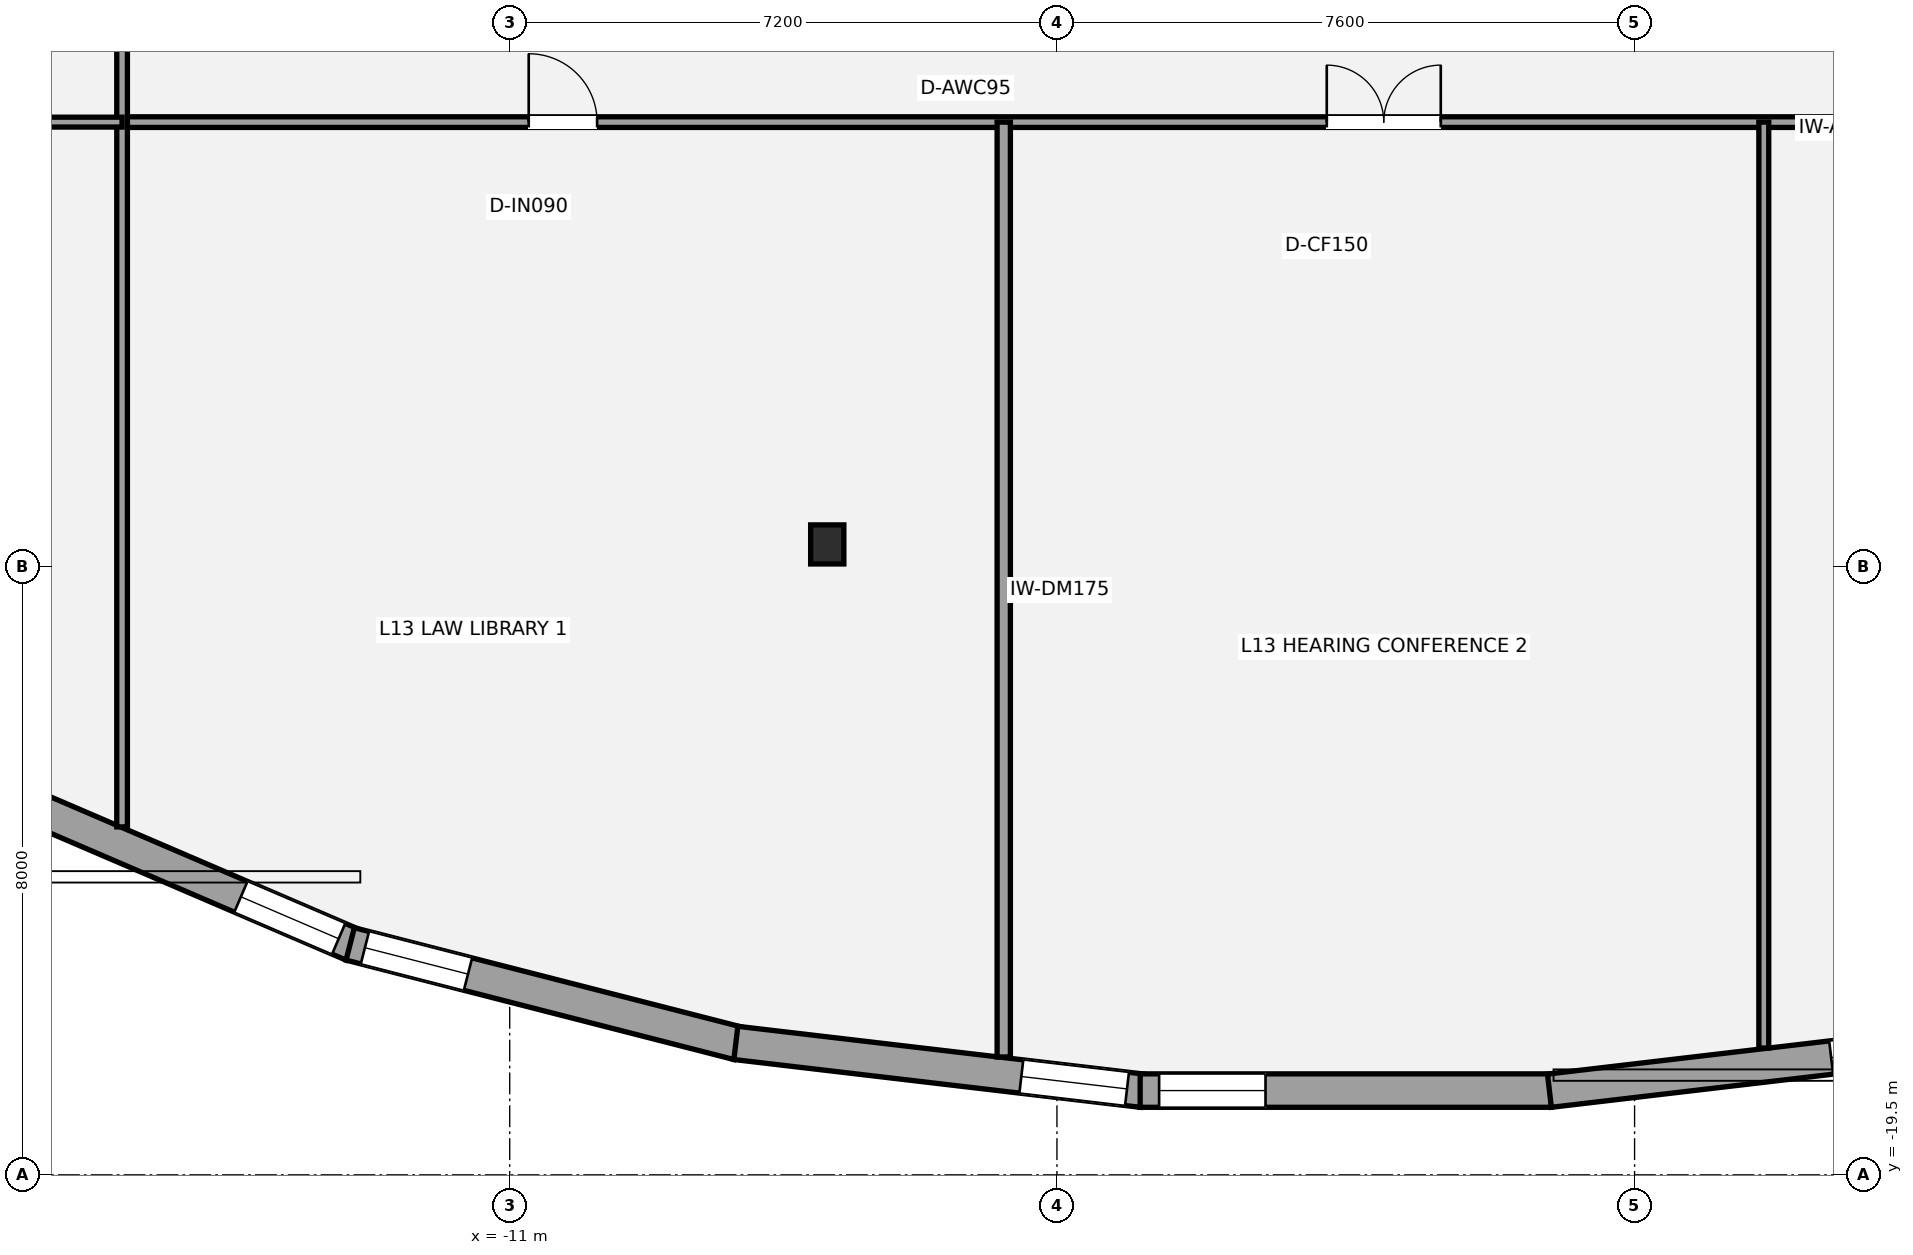
"""IFC4 building model, lengths in metres.
Left out: names, types, materials, properties, quantities, classifications, styles, units other than length and angle.
Written with IfcOpenShell. Run it as: python <this file> out.ifc"""

import sys

from ifc_helpers import new_model, si_unit, direction, frame, frame_2d, origin, origin_2d, place, context, subcontext, project, spatial, rectangle, i_section, extrude, element, fill, save


model = new_model("IFC4")
c1 = context("Model", 3, precision=1e-05, world=origin(), true_north=direction((0.0, 1.0)))
c2 = subcontext(c1, "Body", "Model", "MODEL_VIEW")
j1 = project(units=[si_unit("LENGTHUNIT", "METRE"), si_unit("PLANEANGLEUNIT", "RADIAN")], contexts=[c1])
p1 = place(None, origin())
s1 = spatial("IfcSite", under=j1, at=p1, CompositionType="ELEMENT")
p2 = place(p1, origin())
s2 = spatial("IfcBuilding", under=s1, at=p2, CompositionType="ELEMENT")
p3 = place(p2, frame((0.0, 0.0, 52.2)))
s3 = spatial("IfcBuildingStorey", under=s2, at=p3, CompositionType="ELEMENT", Elevation=52.2)
p4 = place(p3, frame((-6.822, -11.206, 0.0), z_axis=(0.0, 0.0, 1.0), x_axis=(1.0, 0.0, 0.0)))
e1 = element("IfcColumn", 1, at=p4, inside=s3, PredefinedType="COLUMN", context=c2, shape_type="SweptSolid", body=[
    extrude(i_section(OverallWidth=0.437, OverallDepth=0.514, WebThickness=0.061, FlangeThickness=0.097, at=origin_2d()), origin(), (0.0, 0.0, 1.0), 3.6),
])
p5 = place(p3, frame((-13.067, -16.473, 0.0), z_axis=(0.0, 0.0, 1.0), x_axis=(-0.918881850071, 0.394532819433, 0.0)))
e2 = element("IfcWall", 2, at=p5, inside=s3, PredefinedType="STANDARD", context=c2, shape_type="SweptSolid", body=[
    extrude(rectangle(XDim=5.042, YDim=0.44, at=frame_2d((2.521, 0.0))), origin(), (0.0, 0.0, 1.0), 2.533),
])
p6 = place(p5, frame((0.2, 0.0, 0.58)))
e3 = element("IfcOpeningElement", 3, at=p6, cuts=e2, PredefinedType="OPENING", context=c2, shape_type="SweptSolid", body=[
    extrude(rectangle(XDim=1.4, YDim=1.55, at=frame_2d((0.7, 0.775))), frame((0.0, 0.23, 0.0), z_axis=(0.0, -1.0, 0.0), x_axis=(1.0, 0.0, 0.0)), (0.0, 0.0, 1.0), 0.46),
])
p7 = place(p3, frame((-7.996, -17.77, 0.0), z_axis=(0.0, 0.0, 1.0), x_axis=(-0.968705592422, 0.248212560542, 0.0)))
e4 = element("IfcWall", 4, at=p7, inside=s3, PredefinedType="STANDARD", context=c2, shape_type="SweptSolid", body=[
    extrude(rectangle(XDim=5.268, YDim=0.44, at=frame_2d((2.634, 0.0))), origin(), (0.0, 0.0, 1.0), 2.533),
])
p8 = place(p7, frame((3.668, 0.0, 0.45)))
e5 = element("IfcOpeningElement", 5, at=p8, cuts=e4, PredefinedType="OPENING", context=c2, shape_type="SweptSolid", body=[
    extrude(rectangle(XDim=1.4, YDim=1.55, at=frame_2d((0.7, 0.775))), frame((0.0, 0.23, 0.0), z_axis=(0.0, -1.0, 0.0), x_axis=(1.0, 0.0, 0.0)), (0.0, 0.0, 1.0), 0.46),
])
p9 = place(p3, frame((-2.679, -18.393, 0.0), z_axis=(0.0, 0.0, 1.0), x_axis=(-0.993159890371, 0.116762289112, 0.0)))
e6 = element("IfcWall", 6, at=p9, inside=s3, PredefinedType="STANDARD", context=c2, shape_type="SweptSolid", body=[
    extrude(rectangle(XDim=5.382, YDim=0.44, at=frame_2d((2.691, 0.0))), origin(), (0.0, 0.0, 1.0), 2.533),
])
p10 = place(p9, frame((0.2, 0.0, 0.58)))
e7 = element("IfcOpeningElement", 7, at=p10, cuts=e6, PredefinedType="OPENING", context=c2, shape_type="SweptSolid", body=[
    extrude(rectangle(XDim=1.4, YDim=1.55, at=frame_2d((0.7, 0.775))), frame((0.0, 0.23, 0.0), z_axis=(0.0, -1.0, 0.0), x_axis=(1.0, 0.0, 0.0)), (0.0, 0.0, 1.0), 0.46),
])
p11 = place(p3, frame((2.705, -18.391, 0.0), z_axis=(0.0, 0.0, 1.0), x_axis=(-1.0, 0.0, 0.0)))
e8 = element("IfcWall", 8, at=p11, inside=s3, PredefinedType="STANDARD", context=c2, shape_type="SweptSolid", body=[
    extrude(rectangle(XDim=5.41, YDim=0.44, at=frame_2d((2.705, 0.0))), origin(), (0.0, 0.0, 1.0), 2.533),
])
p12 = place(p11, frame((3.761, 0.0, 0.58)))
e9 = element("IfcOpeningElement", 9, at=p12, cuts=e8, PredefinedType="OPENING", context=c2, shape_type="SweptSolid", body=[
    extrude(rectangle(XDim=1.4, YDim=1.55, at=frame_2d((0.7, 0.775))), frame((0.0, 0.23, 0.0), z_axis=(0.0, -1.0, 0.0), x_axis=(1.0, 0.0, 0.0)), (0.0, 0.0, 1.0), 0.46),
])
p13 = place(p3, frame((8.025, -17.764, 0.0), z_axis=(0.0, 0.0, 1.0), x_axis=(-0.993159890371, -0.116762289112, 0.0)))
e10 = element("IfcWall", 10, at=p13, inside=s3, PredefinedType="STANDARD", context=c2, shape_type="SweptSolid", body=[
    extrude(rectangle(XDim=5.382, YDim=0.44, at=frame_2d((2.691, 0.0))), origin(), (0.0, 0.0, 1.0), 2.533),
])
p14 = place(p13, frame((0.25, 0.0, 0.45)))
e11 = element("IfcOpeningElement", 11, at=p14, cuts=e10, PredefinedType="OPENING", context=c2, shape_type="SweptSolid", body=[
    extrude(rectangle(XDim=1.4, YDim=1.55, at=frame_2d((0.7, 0.775))), frame((0.0, 0.23, 0.0), z_axis=(0.0, -1.0, 0.0), x_axis=(1.0, 0.0, 0.0)), (0.0, 0.0, 1.0), 0.46),
])
p15 = place(p3, frame((-16.1, -5.65, 0.0), z_axis=(0.0, 0.0, 1.0), x_axis=(1.0, 0.0, 0.0)))
e12 = element("IfcWall", 12, at=p15, inside=s3, PredefinedType="PARTITIONING", context=c2, shape_type="SweptSolid", body=[
    extrude(rectangle(XDim=34.1, YDim=0.14, at=frame_2d((17.05, 0.0))), origin(), (0.0, 0.0, 1.0), 3.4),
])
p16 = place(p15, frame((5.35, 0.0, 0.0)))
e13 = element("IfcOpeningElement", 13, at=p16, cuts=e12, PredefinedType="OPENING", context=c2, shape_type="SweptSolid", body=[
    extrude(rectangle(XDim=0.9, YDim=2.1, at=frame_2d((0.45, 1.05))), frame((0.0, 0.08, 0.0), z_axis=(0.0, -1.0, 0.0), x_axis=(1.0, 0.0, 0.0)), (0.0, 0.0, 1.0), 0.16),
])
p17 = place(p15, frame((15.85, 0.0, 0.0)))
e14 = element("IfcOpeningElement", 14, at=p17, cuts=e12, PredefinedType="OPENING", context=c2, shape_type="SweptSolid", body=[
    extrude(rectangle(XDim=1.5, YDim=2.15, at=frame_2d((0.75, 1.075))), frame((0.0, 0.08, 0.0), z_axis=(0.0, -1.0, 0.0), x_axis=(1.0, 0.0, 0.0)), (0.0, 0.0, 1.0), 0.16),
])
p18 = place(p15, frame((27.4, 0.0, 0.0)))
e15 = element("IfcOpeningElement", 15, at=p18, cuts=e12, PredefinedType="OPENING", context=c2, shape_type="SweptSolid", body=[
    extrude(rectangle(XDim=0.9, YDim=2.1, at=frame_2d((0.45, 1.05))), frame((0.0, 0.08, 0.0), z_axis=(0.0, -1.0, 0.0), x_axis=(1.0, 0.0, 0.0)), (0.0, 0.0, 1.0), 0.16),
])
p19 = place(p3, frame((-16.1, -14.922, 0.0), z_axis=(0.0, 0.0, 1.0), x_axis=(0.0, 1.0, 0.0)))
e16 = element("IfcWall", 16, at=p19, inside=s3, PredefinedType="PARTITIONING", context=c2, shape_type="SweptSolid", body=[
    extrude(rectangle(XDim=20.772, YDim=0.14, at=frame_2d((10.386, 0.0))), origin(), (0.0, 0.0, 1.0), 2.841),
])
p20 = place(p19, frame((10.547, 0.0, 0.0)))
e17 = element("IfcOpeningElement", 17, at=p20, cuts=e16, PredefinedType="OPENING", context=c2, shape_type="SweptSolid", body=[
    extrude(rectangle(XDim=0.9, YDim=2.1, at=frame_2d((0.45, 1.05))), frame((0.0, 0.08, 0.0), z_axis=(0.0, -1.0, 0.0), x_axis=(1.0, 0.0, 0.0)), (0.0, 0.0, 1.0), 0.16),
])
p21 = place(p19, frame((14.472, 0.0, 0.0)))
e18 = element("IfcOpeningElement", 18, at=p21, cuts=e16, PredefinedType="OPENING", context=c2, shape_type="SweptSolid", body=[
    extrude(rectangle(XDim=0.9, YDim=2.1, at=frame_2d((0.45, 1.05))), frame((0.0, 0.08, 0.0), z_axis=(0.0, -1.0, 0.0), x_axis=(1.0, 0.0, 0.0)), (0.0, 0.0, 1.0), 0.16),
])
p22 = place(p19, frame((18.497, 0.0, 0.0)))
e19 = element("IfcOpeningElement", 19, at=p22, cuts=e16, PredefinedType="OPENING", context=c2, shape_type="SweptSolid", body=[
    extrude(rectangle(XDim=0.9, YDim=2.1, at=frame_2d((0.45, 1.05))), frame((0.0, 0.08, 0.0), z_axis=(0.0, -1.0, 0.0), x_axis=(1.0, 0.0, 0.0)), (0.0, 0.0, 1.0), 0.16),
])
p23 = place(p3, frame((-4.5, -17.949, 0.0), z_axis=(0.0, 0.0, 1.0), x_axis=(0.0, 1.0, 0.0)))
e20 = element("IfcWall", 20, at=p23, inside=s3, PredefinedType="PARTITIONING", context=c2, shape_type="SweptSolid", body=[
    extrude(rectangle(XDim=12.299, YDim=0.175, at=frame_2d((6.15, 0.0))), origin(), (0.0, 0.0, 1.0), 2.853),
])
p24 = place(p3, frame((5.5, -17.832, 0.0), z_axis=(0.0, 0.0, 1.0), x_axis=(0.0, 1.0, 0.0)))
e21 = element("IfcWall", 21, at=p24, inside=s3, PredefinedType="PARTITIONING", context=c2, shape_type="SweptSolid", body=[
    extrude(rectangle(XDim=12.182, YDim=0.13, at=frame_2d((6.091, 0.0))), origin(), (0.0, 0.0, 1.0), 2.853),
])
p25 = place(p3, frame((-25.917, -5.65, 0.0), z_axis=(0.0, 0.0, 1.0), x_axis=(1.0, 0.0, 0.0)))
e22 = element("IfcWall", 22, at=p25, inside=s3, PredefinedType="PARTITIONING", context=c2, shape_type="SweptSolid", body=[
    extrude(rectangle(XDim=9.816, YDim=0.13, at=frame_2d((4.908, 0.0))), origin(), (0.0, 0.0, 1.0), 2.779),
])
p26 = place(p25, frame((0.51, 0.0, 0.0)))
e23 = element("IfcOpeningElement", 23, at=p26, cuts=e22, PredefinedType="OPENING", context=c2, shape_type="SweptSolid", body=[
    extrude(rectangle(XDim=0.9, YDim=2.1, at=frame_2d((0.45, 1.05))), frame((0.0, 0.075, 0.0), z_axis=(0.0, -1.0, 0.0), x_axis=(1.0, 0.0, 0.0)), (0.0, 0.0, 1.0), 0.15),
])
p27 = place(p6, origin())
e24 = element("IfcWindow", 24, at=p27, inside=s3, PartitioningType="SINGLE_PANEL", PredefinedType="WINDOW", context=c2, shape_type="SweptSolid", body=[
    extrude(rectangle(XDim=1.4, YDim=1.55, at=frame_2d((0.7, 0.775))), frame((0.0, -0.01, 0.0), z_axis=(0.0, -1.0, 0.0), x_axis=(1.0, 0.0, 0.0)), (0.0, 0.0, 1.0), 0.06),
])
fill(e3, e24)
p28 = place(p8, origin())
e25 = element("IfcWindow", 25, at=p28, inside=s3, PartitioningType="SINGLE_PANEL", PredefinedType="WINDOW", context=c2, shape_type="SweptSolid", body=[
    extrude(rectangle(XDim=1.4, YDim=1.55, at=frame_2d((0.7, 0.775))), frame((0.0, -0.01, 0.0), z_axis=(0.0, -1.0, 0.0), x_axis=(1.0, 0.0, 0.0)), (0.0, 0.0, 1.0), 0.06),
])
fill(e5, e25)
p29 = place(p10, origin())
e26 = element("IfcWindow", 26, at=p29, inside=s3, PartitioningType="SINGLE_PANEL", PredefinedType="WINDOW", context=c2, shape_type="SweptSolid", body=[
    extrude(rectangle(XDim=1.4, YDim=1.55, at=frame_2d((0.7, 0.775))), frame((0.0, -0.01, 0.0), z_axis=(0.0, -1.0, 0.0), x_axis=(1.0, 0.0, 0.0)), (0.0, 0.0, 1.0), 0.06),
])
fill(e7, e26)
p30 = place(p12, origin())
e27 = element("IfcWindow", 27, at=p30, inside=s3, PartitioningType="SINGLE_PANEL", PredefinedType="WINDOW", context=c2, shape_type="SweptSolid", body=[
    extrude(rectangle(XDim=1.4, YDim=1.55, at=frame_2d((0.7, 0.775))), frame((0.0, -0.01, 0.0), z_axis=(0.0, -1.0, 0.0), x_axis=(1.0, 0.0, 0.0)), (0.0, 0.0, 1.0), 0.06),
])
fill(e9, e27)
p31 = place(p14, origin())
e28 = element("IfcWindow", 28, at=p31, inside=s3, PartitioningType="SINGLE_PANEL", PredefinedType="WINDOW", context=c2, shape_type="SweptSolid", body=[
    extrude(rectangle(XDim=1.4, YDim=1.55, at=frame_2d((0.7, 0.775))), frame((0.0, -0.01, 0.0), z_axis=(0.0, -1.0, 0.0), x_axis=(1.0, 0.0, 0.0)), (0.0, 0.0, 1.0), 0.06),
])
fill(e11, e28)
p32 = place(p16, origin())
e29 = element("IfcDoor", 29, at=p32, inside=s3, OperationType="SINGLE_SWING_LEFT", PredefinedType="DOOR", context=c2, shape_type="SweptSolid", body=[
    extrude(rectangle(XDim=0.9, YDim=2.1, at=frame_2d((0.45, 1.05))), frame((0.0, 0.025, 0.0), z_axis=(0.0, -1.0, 0.0), x_axis=(1.0, 0.0, 0.0)), (0.0, 0.0, 1.0), 0.05),
])
fill(e13, e29)
p33 = place(p17, origin())
e30 = element("IfcDoor", 30, at=p33, inside=s3, OperationType="DOUBLE_DOOR_SINGLE_SWING", PredefinedType="DOOR", context=c2, shape_type="SweptSolid", body=[
    extrude(rectangle(XDim=1.5, YDim=2.15, at=frame_2d((0.75, 1.075))), frame((0.0, 0.025, 0.0), z_axis=(0.0, -1.0, 0.0), x_axis=(1.0, 0.0, 0.0)), (0.0, 0.0, 1.0), 0.05),
])
fill(e14, e30)
save(model, sys.argv[1])
